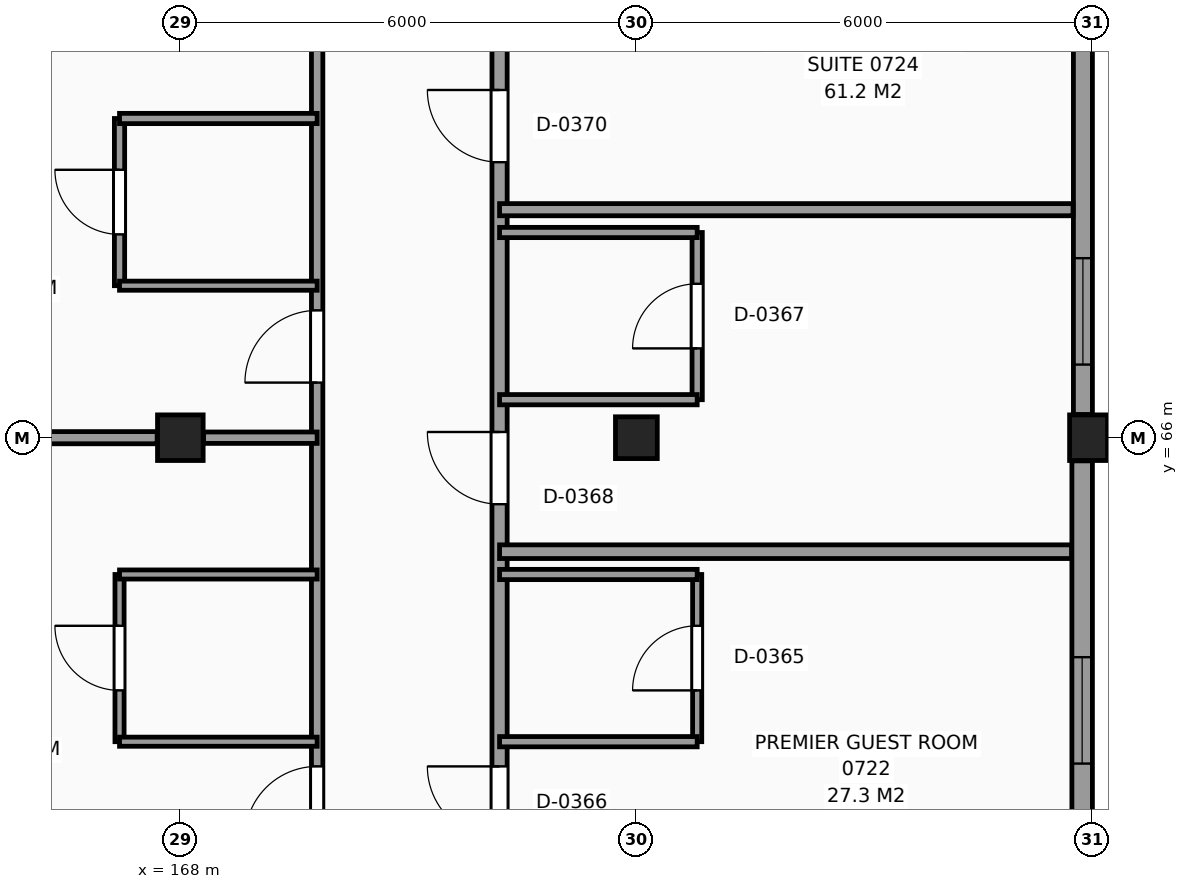
"""IFC4 building model, lengths in metres.
Left out: names, types, materials, properties, quantities, classifications, styles, units other than length and angle.
Written with IfcOpenShell. Run it as: python <this file> out.ifc"""

import sys

from ifc_helpers import new_model, si_unit, direction, frame, frame_2d, origin, origin_2d, place, context, subcontext, project, spatial, rectangle, extrude, element, fill, save


model = new_model("IFC4")
c1 = context("Model", 3, precision=1e-05, world=origin(), true_north=direction((0.0, 1.0)))
c2 = subcontext(c1, "Body", "Model", "MODEL_VIEW")
j1 = project(units=[si_unit("LENGTHUNIT", "METRE"), si_unit("PLANEANGLEUNIT", "RADIAN")], contexts=[c1])
p1 = place(None, origin())
s1 = spatial("IfcSite", under=j1, at=p1, CompositionType="ELEMENT")
p2 = place(p1, origin())
s2 = spatial("IfcBuilding", under=s1, at=p2, CompositionType="ELEMENT")
p3 = place(p2, frame((0.0, 0.0, 31.5)))
s3 = spatial("IfcBuildingStorey", under=s2, at=p3, CompositionType="ELEMENT", Elevation=31.5)
p4 = place(p3, frame((168.0, 66.0, 0.0), z_axis=(0.0, 0.0, 1.0), x_axis=(1.0, 0.0, 0.0)))
e1 = element("IfcColumn", 1, at=p4, inside=s3, PredefinedType="COLUMN", context=c2, shape_type="SweptSolid", body=[
    extrude(rectangle(XDim=0.6, YDim=0.6, at=origin_2d()), origin(), (0.0, 0.0, 1.0), 3.3),
])
p5 = place(p3, frame((174.0, 66.0, 0.0), z_axis=(0.0, 0.0, 1.0), x_axis=(1.0, 0.0, 0.0)))
e2 = element("IfcColumn", 2, at=p5, inside=s3, PredefinedType="COLUMN", context=c2, shape_type="SweptSolid", body=[
    extrude(rectangle(XDim=0.55, YDim=0.55, at=origin_2d()), origin(), (0.0, 0.0, 1.0), 3.3),
])
p6 = place(p3, frame((180.0, 66.0, 0.0), z_axis=(0.0, 0.0, 1.0), x_axis=(1.0, 0.0, 0.0)))
e3 = element("IfcColumn", 3, at=p6, inside=s3, PredefinedType="COLUMN", context=c2, shape_type="SweptSolid", body=[
    extrude(rectangle(XDim=0.6, YDim=0.6, at=origin_2d()), origin(), (0.0, 0.0, 1.0), 3.3),
])
p7 = place(p3, frame((179.865, 60.305, 0.0), z_axis=(0.0, 0.0, 1.0), x_axis=(0.0, 1.0, 0.0)))
e4 = element("IfcWall", 4, at=p7, inside=s3, PredefinedType="SOLIDWALL", context=c2, shape_type="SweptSolid", body=[
    extrude(rectangle(XDim=5.39, YDim=0.27, at=frame_2d((2.695, 0.0))), origin(), (0.0, 0.0, 1.0), 2.42),
])
p8 = place(p7, frame((1.407, 0.0, 0.8)))
e5 = element("IfcOpeningElement", 5, at=p8, cuts=e4, PredefinedType="OPENING", context=c2, shape_type="SweptSolid", body=[
    extrude(rectangle(XDim=1.4, YDim=1.4, at=frame_2d((0.7, 0.7))), frame((0.0, 0.145, 0.0), z_axis=(0.0, -1.0, 0.0), x_axis=(1.0, 0.0, 0.0)), (0.0, 0.0, 1.0), 0.29),
])
p9 = place(p3, frame((179.875, 66.305, 0.0), z_axis=(0.0, 0.0, 1.0), x_axis=(0.0, 1.0, 0.0)))
e6 = element("IfcWall", 6, at=p9, inside=s3, PredefinedType="SOLIDWALL", context=c2, shape_type="SweptSolid", body=[
    extrude(rectangle(XDim=5.39, YDim=0.25, at=frame_2d((2.695, 0.0))), origin(), (0.0, 0.0, 1.0), 2.42),
])
p10 = place(p9, frame((0.657, 0.0, 0.8)))
e7 = element("IfcOpeningElement", 7, at=p10, cuts=e6, PredefinedType="OPENING", context=c2, shape_type="SweptSolid", body=[
    extrude(rectangle(XDim=1.4, YDim=1.4, at=frame_2d((0.7, 0.7))), frame((0.0, 0.135, 0.0), z_axis=(0.0, -1.0, 0.0), x_axis=(1.0, 0.0, 0.0)), (0.0, 0.0, 1.0), 0.27),
])
p11 = place(p3, frame((167.2, 62.0, 0.0), z_axis=(0.0, 0.0, 1.0), x_axis=(0.0, 1.0, 0.0)))
e8 = element("IfcWall", 8, at=p11, inside=s3, PredefinedType="PARTITIONING", context=c2, shape_type="SweptSolid", body=[
    extrude(rectangle(XDim=2.2, YDim=0.12, at=frame_2d((1.1, 0.0))), origin(), (0.0, 0.0, 1.0), 3.07),
])
p12 = place(p11, frame((0.675, 0.0, 0.0)))
e9 = element("IfcOpeningElement", 9, at=p12, cuts=e8, PredefinedType="OPENING", context=c2, shape_type="SweptSolid", body=[
    extrude(rectangle(XDim=0.85, YDim=2.1, at=frame_2d((0.425, 1.05))), frame((0.0, 0.07, 0.0), z_axis=(0.0, -1.0, 0.0), x_axis=(1.0, 0.0, 0.0)), (0.0, 0.0, 1.0), 0.14),
])
p13 = place(p3, frame((167.2, 68.0, 0.0), z_axis=(0.0, 0.0, 1.0), x_axis=(0.0, 1.0, 0.0)))
e10 = element("IfcWall", 10, at=p13, inside=s3, PredefinedType="PARTITIONING", context=c2, shape_type="SweptSolid", body=[
    extrude(rectangle(XDim=2.2, YDim=0.135, at=frame_2d((1.1, 0.0))), origin(), (0.0, 0.0, 1.0), 3.07),
])
p14 = place(p13, frame((0.675, 0.0, 0.0)))
e11 = element("IfcOpeningElement", 11, at=p14, cuts=e10, PredefinedType="OPENING", context=c2, shape_type="SweptSolid", body=[
    extrude(rectangle(XDim=0.85, YDim=2.1, at=frame_2d((0.425, 1.05))), frame((0.0, 0.078, 0.0), z_axis=(0.0, -1.0, 0.0), x_axis=(1.0, 0.0, 0.0)), (0.0, 0.0, 1.0), 0.155),
])
p15 = place(p3, frame((169.8, 42.255, 0.0), z_axis=(0.0, 0.0, 1.0), x_axis=(0.0, 1.0, 0.0)))
e12 = element("IfcWall", 12, at=p15, inside=s3, PredefinedType="PARTITIONING", context=c2, shape_type="SweptSolid", body=[
    extrude(rectangle(XDim=65.565, YDim=0.15, at=frame_2d((32.783, 0.0))), origin(), (0.0, 0.0, 1.0), 3.07),
])
p16 = place(p15, frame((50.145, 0.0, 0.0)))
e13 = element("IfcOpeningElement", 13, at=p16, cuts=e12, PredefinedType="OPENING", context=c2, shape_type="SweptSolid", body=[
    extrude(rectangle(XDim=1.2, YDim=2.2, at=frame_2d((0.6, 1.1))), frame((0.0, 0.085, 0.0), z_axis=(0.0, -1.0, 0.0), x_axis=(1.0, 0.0, 0.0)), (0.0, 0.0, 1.0), 0.17),
])
p17 = place(p15, frame((0.42, 0.0, 0.0)))
e14 = element("IfcOpeningElement", 14, at=p17, cuts=e12, PredefinedType="OPENING", context=c2, shape_type="SweptSolid", body=[
    extrude(rectangle(XDim=0.95, YDim=2.1, at=frame_2d((0.475, 1.05))), frame((0.0, 0.085, 0.0), z_axis=(0.0, -1.0, 0.0), x_axis=(1.0, 0.0, 0.0)), (0.0, 0.0, 1.0), 0.17),
])
p18 = place(p15, frame((6.47, 0.0, 0.0)))
e15 = element("IfcOpeningElement", 15, at=p18, cuts=e12, PredefinedType="OPENING", context=c2, shape_type="SweptSolid", body=[
    extrude(rectangle(XDim=0.95, YDim=2.1, at=frame_2d((0.475, 1.05))), frame((0.0, 0.085, 0.0), z_axis=(0.0, -1.0, 0.0), x_axis=(1.0, 0.0, 0.0)), (0.0, 0.0, 1.0), 0.17),
])
p19 = place(p15, frame((12.47, 0.0, 0.0)))
e16 = element("IfcOpeningElement", 16, at=p19, cuts=e12, PredefinedType="OPENING", context=c2, shape_type="SweptSolid", body=[
    extrude(rectangle(XDim=0.95, YDim=2.1, at=frame_2d((0.475, 1.05))), frame((0.0, 0.085, 0.0), z_axis=(0.0, -1.0, 0.0), x_axis=(1.0, 0.0, 0.0)), (0.0, 0.0, 1.0), 0.17),
])
p20 = place(p15, frame((18.47, 0.0, 0.0)))
e17 = element("IfcOpeningElement", 17, at=p20, cuts=e12, PredefinedType="OPENING", context=c2, shape_type="SweptSolid", body=[
    extrude(rectangle(XDim=0.95, YDim=2.1, at=frame_2d((0.475, 1.05))), frame((0.0, 0.085, 0.0), z_axis=(0.0, -1.0, 0.0), x_axis=(1.0, 0.0, 0.0)), (0.0, 0.0, 1.0), 0.17),
])
p21 = place(p15, frame((24.47, 0.0, 0.0)))
e18 = element("IfcOpeningElement", 18, at=p21, cuts=e12, PredefinedType="OPENING", context=c2, shape_type="SweptSolid", body=[
    extrude(rectangle(XDim=0.95, YDim=2.1, at=frame_2d((0.475, 1.05))), frame((0.0, 0.085, 0.0), z_axis=(0.0, -1.0, 0.0), x_axis=(1.0, 0.0, 0.0)), (0.0, 0.0, 1.0), 0.17),
])
p22 = place(p15, frame((30.47, 0.0, 0.0)))
e19 = element("IfcOpeningElement", 19, at=p22, cuts=e12, PredefinedType="OPENING", context=c2, shape_type="SweptSolid", body=[
    extrude(rectangle(XDim=0.95, YDim=2.1, at=frame_2d((0.475, 1.05))), frame((0.0, 0.085, 0.0), z_axis=(0.0, -1.0, 0.0), x_axis=(1.0, 0.0, 0.0)), (0.0, 0.0, 1.0), 0.17),
])
p23 = place(p15, frame((54.47, 0.0, 0.0)))
e20 = element("IfcOpeningElement", 20, at=p23, cuts=e12, PredefinedType="OPENING", context=c2, shape_type="SweptSolid", body=[
    extrude(rectangle(XDim=0.95, YDim=2.1, at=frame_2d((0.475, 1.05))), frame((0.0, 0.085, 0.0), z_axis=(0.0, -1.0, 0.0), x_axis=(1.0, 0.0, 0.0)), (0.0, 0.0, 1.0), 0.17),
])
p24 = place(p15, frame((60.47, 0.0, 0.0)))
e21 = element("IfcOpeningElement", 21, at=p24, cuts=e12, PredefinedType="OPENING", context=c2, shape_type="SweptSolid", body=[
    extrude(rectangle(XDim=0.95, YDim=2.1, at=frame_2d((0.475, 1.05))), frame((0.0, 0.085, 0.0), z_axis=(0.0, -1.0, 0.0), x_axis=(1.0, 0.0, 0.0)), (0.0, 0.0, 1.0), 0.17),
])
p25 = place(p3, frame((172.2, 42.255, 0.0), z_axis=(0.0, 0.0, 1.0), x_axis=(0.0, 1.0, 0.0)))
e22 = element("IfcWall", 22, at=p25, inside=s3, PredefinedType="PARTITIONING", context=c2, shape_type="SweptSolid", body=[
    extrude(rectangle(XDim=65.565, YDim=0.2, at=frame_2d((32.783, 0.0))), origin(), (0.0, 0.0, 1.0), 3.07),
])
p26 = place(p25, frame((0.42, 0.0, 0.0)))
e23 = element("IfcOpeningElement", 23, at=p26, cuts=e22, PredefinedType="OPENING", context=c2, shape_type="SweptSolid", body=[
    extrude(rectangle(XDim=0.95, YDim=2.1, at=frame_2d((0.475, 1.05))), frame((0.0, 0.11, 0.0), z_axis=(0.0, -1.0, 0.0), x_axis=(1.0, 0.0, 0.0)), (0.0, 0.0, 1.0), 0.22),
])
p27 = place(p25, frame((6.47, 0.0, 0.0)))
e24 = element("IfcOpeningElement", 24, at=p27, cuts=e22, PredefinedType="OPENING", context=c2, shape_type="SweptSolid", body=[
    extrude(rectangle(XDim=0.95, YDim=2.1, at=frame_2d((0.475, 1.05))), frame((0.0, 0.11, 0.0), z_axis=(0.0, -1.0, 0.0), x_axis=(1.0, 0.0, 0.0)), (0.0, 0.0, 1.0), 0.22),
])
p28 = place(p25, frame((16.27, 0.0, 0.0)))
e25 = element("IfcOpeningElement", 25, at=p28, cuts=e22, PredefinedType="OPENING", context=c2, shape_type="SweptSolid", body=[
    extrude(rectangle(XDim=0.95, YDim=2.1, at=frame_2d((0.475, 1.05))), frame((0.0, 0.11, 0.0), z_axis=(0.0, -1.0, 0.0), x_axis=(1.0, 0.0, 0.0)), (0.0, 0.0, 1.0), 0.22),
])
p29 = place(p25, frame((18.47, 0.0, 0.0)))
e26 = element("IfcOpeningElement", 26, at=p29, cuts=e22, PredefinedType="OPENING", context=c2, shape_type="SweptSolid", body=[
    extrude(rectangle(XDim=0.95, YDim=2.1, at=frame_2d((0.475, 1.05))), frame((0.0, 0.11, 0.0), z_axis=(0.0, -1.0, 0.0), x_axis=(1.0, 0.0, 0.0)), (0.0, 0.0, 1.0), 0.22),
])
p30 = place(p25, frame((22.87, 0.0, 0.0)))
e27 = element("IfcOpeningElement", 27, at=p30, cuts=e22, PredefinedType="OPENING", context=c2, shape_type="SweptSolid", body=[
    extrude(rectangle(XDim=0.95, YDim=2.1, at=frame_2d((0.475, 1.05))), frame((0.0, 0.11, 0.0), z_axis=(0.0, -1.0, 0.0), x_axis=(1.0, 0.0, 0.0)), (0.0, 0.0, 1.0), 0.22),
])
p31 = place(p25, frame((27.37, 0.0, 0.0)))
e28 = element("IfcOpeningElement", 28, at=p31, cuts=e22, PredefinedType="OPENING", context=c2, shape_type="SweptSolid", body=[
    extrude(rectangle(XDim=0.95, YDim=2.1, at=frame_2d((0.475, 1.05))), frame((0.0, 0.11, 0.0), z_axis=(0.0, -1.0, 0.0), x_axis=(1.0, 0.0, 0.0)), (0.0, 0.0, 1.0), 0.22),
])
p32 = place(p25, frame((36.47, 0.0, 0.0)))
e29 = element("IfcOpeningElement", 29, at=p32, cuts=e22, PredefinedType="OPENING", context=c2, shape_type="SweptSolid", body=[
    extrude(rectangle(XDim=0.95, YDim=2.1, at=frame_2d((0.475, 1.05))), frame((0.0, 0.11, 0.0), z_axis=(0.0, -1.0, 0.0), x_axis=(1.0, 0.0, 0.0)), (0.0, 0.0, 1.0), 0.22),
])
p33 = place(p25, frame((40.87, 0.0, 0.0)))
e30 = element("IfcOpeningElement", 30, at=p33, cuts=e22, PredefinedType="OPENING", context=c2, shape_type="SweptSolid", body=[
    extrude(rectangle(XDim=0.95, YDim=2.1, at=frame_2d((0.475, 1.05))), frame((0.0, 0.11, 0.0), z_axis=(0.0, -1.0, 0.0), x_axis=(1.0, 0.0, 0.0)), (0.0, 0.0, 1.0), 0.22),
])
p34 = place(p25, frame((48.07, 0.0, 0.0)))
e31 = element("IfcOpeningElement", 31, at=p34, cuts=e22, PredefinedType="OPENING", context=c2, shape_type="SweptSolid", body=[
    extrude(rectangle(XDim=0.95, YDim=2.1, at=frame_2d((0.475, 1.05))), frame((0.0, 0.11, 0.0), z_axis=(0.0, -1.0, 0.0), x_axis=(1.0, 0.0, 0.0)), (0.0, 0.0, 1.0), 0.22),
])
p35 = place(p25, frame((56.32, 0.0, 0.0)))
e32 = element("IfcOpeningElement", 32, at=p35, cuts=e22, PredefinedType="OPENING", context=c2, shape_type="SweptSolid", body=[
    extrude(rectangle(XDim=0.95, YDim=2.1, at=frame_2d((0.475, 1.05))), frame((0.0, 0.11, 0.0), z_axis=(0.0, -1.0, 0.0), x_axis=(1.0, 0.0, 0.0)), (0.0, 0.0, 1.0), 0.22),
])
p36 = place(p25, frame((60.47, 0.0, 0.0)))
e33 = element("IfcOpeningElement", 33, at=p36, cuts=e22, PredefinedType="OPENING", context=c2, shape_type="SweptSolid", body=[
    extrude(rectangle(XDim=0.95, YDim=2.1, at=frame_2d((0.475, 1.05))), frame((0.0, 0.11, 0.0), z_axis=(0.0, -1.0, 0.0), x_axis=(1.0, 0.0, 0.0)), (0.0, 0.0, 1.0), 0.22),
])
p37 = place(p3, frame((174.8, 62.0, 0.0), z_axis=(0.0, 0.0, 1.0), x_axis=(0.0, 1.0, 0.0)))
e34 = element("IfcWall", 34, at=p37, inside=s3, PredefinedType="PARTITIONING", context=c2, shape_type="SweptSolid", body=[
    extrude(rectangle(XDim=2.2, YDim=0.12, at=frame_2d((1.1, 0.0))), origin(), (0.0, 0.0, 1.0), 3.07),
])
p38 = place(p37, frame((0.675, 0.0, 0.0)))
e35 = element("IfcOpeningElement", 35, at=p38, cuts=e34, PredefinedType="OPENING", context=c2, shape_type="SweptSolid", body=[
    extrude(rectangle(XDim=0.85, YDim=2.1, at=frame_2d((0.425, 1.05))), frame((0.0, 0.07, 0.0), z_axis=(0.0, -1.0, 0.0), x_axis=(1.0, 0.0, 0.0)), (0.0, 0.0, 1.0), 0.14),
])
p39 = place(p3, frame((174.8, 66.5, 0.0), z_axis=(0.0, 0.0, 1.0), x_axis=(0.0, 1.0, 0.0)))
e36 = element("IfcWall", 36, at=p39, inside=s3, PredefinedType="PARTITIONING", context=c2, shape_type="SweptSolid", body=[
    extrude(rectangle(XDim=2.2, YDim=0.135, at=frame_2d((1.1, 0.0))), origin(), (0.0, 0.0, 1.0), 3.07),
])
p40 = place(p39, frame((0.675, 0.0, 0.0)))
e37 = element("IfcOpeningElement", 37, at=p40, cuts=e36, PredefinedType="OPENING", context=c2, shape_type="SweptSolid", body=[
    extrude(rectangle(XDim=0.85, YDim=2.1, at=frame_2d((0.425, 1.05))), frame((0.0, 0.078, 0.0), z_axis=(0.0, -1.0, 0.0), x_axis=(1.0, 0.0, 0.0)), (0.0, 0.0, 1.0), 0.155),
])
p41 = place(p3, frame((167.2, 62.0, 0.0), z_axis=(0.0, 0.0, 1.0), x_axis=(1.0, 0.0, 0.0)))
e38 = element("IfcWall", 38, at=p41, inside=s3, PredefinedType="PARTITIONING", context=c2, shape_type="SweptSolid", body=[
    extrude(rectangle(XDim=2.6, YDim=0.12, at=frame_2d((1.3, 0.0))), origin(), (0.0, 0.0, 1.0), 3.07),
])
p42 = place(p3, frame((172.2, 62.0, 0.0), z_axis=(0.0, 0.0, 1.0), x_axis=(1.0, 0.0, 0.0)))
e39 = element("IfcWall", 39, at=p42, inside=s3, PredefinedType="PARTITIONING", context=c2, shape_type="SweptSolid", body=[
    extrude(rectangle(XDim=2.6, YDim=0.135, at=frame_2d((1.3, 0.0))), origin(), (0.0, 0.0, 1.0), 3.07),
])
p43 = place(p3, frame((167.2, 64.2, 0.0), z_axis=(0.0, 0.0, 1.0), x_axis=(1.0, 0.0, 0.0)))
e40 = element("IfcWall", 40, at=p43, inside=s3, PredefinedType="PARTITIONING", context=c2, shape_type="SweptSolid", body=[
    extrude(rectangle(XDim=2.6, YDim=0.12, at=frame_2d((1.3, 0.0))), origin(), (0.0, 0.0, 1.0), 3.07),
])
p44 = place(p3, frame((172.2, 64.2, 0.0), z_axis=(0.0, 0.0, 1.0), x_axis=(1.0, 0.0, 0.0)))
e41 = element("IfcWall", 41, at=p44, inside=s3, PredefinedType="PARTITIONING", context=c2, shape_type="SweptSolid", body=[
    extrude(rectangle(XDim=2.6, YDim=0.135, at=frame_2d((1.3, 0.0))), origin(), (0.0, 0.0, 1.0), 3.07),
])
p45 = place(p3, frame((172.2, 64.5, 0.0), z_axis=(0.0, 0.0, 1.0), x_axis=(1.0, 0.0, 0.0)))
e42 = element("IfcWall", 42, at=p45, inside=s3, PredefinedType="PARTITIONING", context=c2, shape_type="SweptSolid", body=[
    extrude(rectangle(XDim=7.525, YDim=0.18, at=frame_2d((3.763, 0.0))), origin(), (0.0, 0.0, 1.0), 3.07),
])
p46 = place(p3, frame((162.28, 66.0, 0.0), z_axis=(0.0, 0.0, 1.0), x_axis=(1.0, 0.0, 0.0)))
e43 = element("IfcWall", 43, at=p46, inside=s3, PredefinedType="PARTITIONING", context=c2, shape_type="SweptSolid", body=[
    extrude(rectangle(XDim=5.415, YDim=0.16, at=frame_2d((2.708, 0.0))), origin(), (0.0, 0.0, 1.0), 2.27),
])
p47 = place(p3, frame((168.305, 66.0, 0.0), z_axis=(0.0, 0.0, 1.0), x_axis=(1.0, 0.0, 0.0)))
e44 = element("IfcWall", 44, at=p47, inside=s3, PredefinedType="PARTITIONING", context=c2, shape_type="SweptSolid", body=[
    extrude(rectangle(XDim=1.495, YDim=0.15, at=frame_2d((0.748, 0.0))), origin(), (0.0, 0.0, 1.0), 2.27),
])
p48 = place(p3, frame((172.2, 66.5, 0.0), z_axis=(0.0, 0.0, 1.0), x_axis=(1.0, 0.0, 0.0)))
e45 = element("IfcWall", 45, at=p48, inside=s3, PredefinedType="PARTITIONING", context=c2, shape_type="SweptSolid", body=[
    extrude(rectangle(XDim=2.6, YDim=0.135, at=frame_2d((1.3, 0.0))), origin(), (0.0, 0.0, 1.0), 3.07),
])
p49 = place(p3, frame((167.2, 68.0, 0.0), z_axis=(0.0, 0.0, 1.0), x_axis=(1.0, 0.0, 0.0)))
e46 = element("IfcWall", 46, at=p49, inside=s3, PredefinedType="PARTITIONING", context=c2, shape_type="SweptSolid", body=[
    extrude(rectangle(XDim=2.6, YDim=0.12, at=frame_2d((1.3, 0.0))), origin(), (0.0, 0.0, 1.0), 3.07),
])
p50 = place(p3, frame((172.2, 68.7, 0.0), z_axis=(0.0, 0.0, 1.0), x_axis=(1.0, 0.0, 0.0)))
e47 = element("IfcWall", 47, at=p50, inside=s3, PredefinedType="PARTITIONING", context=c2, shape_type="SweptSolid", body=[
    extrude(rectangle(XDim=2.6, YDim=0.135, at=frame_2d((1.3, 0.0))), origin(), (0.0, 0.0, 1.0), 3.07),
])
p51 = place(p3, frame((172.2, 69.0, 0.0), z_axis=(0.0, 0.0, 1.0), x_axis=(1.0, 0.0, 0.0)))
e48 = element("IfcWall", 48, at=p51, inside=s3, PredefinedType="PARTITIONING", context=c2, shape_type="SweptSolid", body=[
    extrude(rectangle(XDim=7.545, YDim=0.16, at=frame_2d((3.772, 0.0))), origin(), (0.0, 0.0, 1.0), 3.07),
])
p52 = place(p3, frame((167.2, 70.2, 0.0), z_axis=(0.0, 0.0, 1.0), x_axis=(1.0, 0.0, 0.0)))
e49 = element("IfcWall", 49, at=p52, inside=s3, PredefinedType="PARTITIONING", context=c2, shape_type="SweptSolid", body=[
    extrude(rectangle(XDim=2.6, YDim=0.135, at=frame_2d((1.3, 0.0))), origin(), (0.0, 0.0, 1.0), 3.07),
])
p53 = place(p8, origin())
e50 = element("IfcWindow", 50, at=p53, inside=s3, PartitioningType="SINGLE_PANEL", PredefinedType="WINDOW", context=c2, shape_type="SweptSolid", body=[
    extrude(rectangle(XDim=1.4, YDim=1.4, at=frame_2d((0.7, 0.7))), frame((0.0, 0.03, 0.0), z_axis=(0.0, -1.0, 0.0), x_axis=(1.0, 0.0, 0.0)), (0.0, 0.0, 1.0), 0.06),
])
fill(e5, e50)
p54 = place(p10, origin())
e51 = element("IfcWindow", 51, at=p54, inside=s3, PartitioningType="SINGLE_PANEL", PredefinedType="WINDOW", context=c2, shape_type="SweptSolid", body=[
    extrude(rectangle(XDim=1.4, YDim=1.4, at=frame_2d((0.7, 0.7))), frame((0.0, 0.03, 0.0), z_axis=(0.0, -1.0, 0.0), x_axis=(1.0, 0.0, 0.0)), (0.0, 0.0, 1.0), 0.06),
])
fill(e7, e51)
p55 = place(p38, origin())
e52 = element("IfcDoor", 52, at=p55, inside=s3, OperationType="SINGLE_SWING_LEFT", PredefinedType="DOOR", context=c2, shape_type="SweptSolid", body=[
    extrude(rectangle(XDim=0.85, YDim=2.1, at=frame_2d((0.425, 1.05))), frame((0.0, 0.025, 0.0), z_axis=(0.0, -1.0, 0.0), x_axis=(1.0, 0.0, 0.0)), (0.0, 0.0, 1.0), 0.05),
])
fill(e35, e52)
p56 = place(p29, origin())
e53 = element("IfcDoor", 53, at=p56, inside=s3, OperationType="SINGLE_SWING_RIGHT", PredefinedType="DOOR", context=c2, shape_type="SweptSolid", body=[
    extrude(rectangle(XDim=0.95, YDim=2.1, at=frame_2d((0.475, 1.05))), frame((0.0, 0.025, 0.0), z_axis=(0.0, -1.0, 0.0), x_axis=(1.0, 0.0, 0.0)), (0.0, 0.0, 1.0), 0.05),
])
fill(e26, e53)
p57 = place(p40, origin())
e54 = element("IfcDoor", 54, at=p57, inside=s3, OperationType="SINGLE_SWING_LEFT", PredefinedType="DOOR", context=c2, shape_type="SweptSolid", body=[
    extrude(rectangle(XDim=0.85, YDim=2.1, at=frame_2d((0.425, 1.05))), frame((0.0, 0.025, 0.0), z_axis=(0.0, -1.0, 0.0), x_axis=(1.0, 0.0, 0.0)), (0.0, 0.0, 1.0), 0.05),
])
fill(e37, e54)
p58 = place(p30, origin())
e55 = element("IfcDoor", 55, at=p58, inside=s3, OperationType="SINGLE_SWING_RIGHT", PredefinedType="DOOR", context=c2, shape_type="SweptSolid", body=[
    extrude(rectangle(XDim=0.95, YDim=2.1, at=frame_2d((0.475, 1.05))), frame((0.0, 0.025, 0.0), z_axis=(0.0, -1.0, 0.0), x_axis=(1.0, 0.0, 0.0)), (0.0, 0.0, 1.0), 0.05),
])
fill(e27, e55)
p59 = place(p31, origin())
e56 = element("IfcDoor", 56, at=p59, inside=s3, OperationType="SINGLE_SWING_RIGHT", PredefinedType="DOOR", context=c2, shape_type="SweptSolid", body=[
    extrude(rectangle(XDim=0.95, YDim=2.1, at=frame_2d((0.475, 1.05))), frame((0.0, 0.025, 0.0), z_axis=(0.0, -1.0, 0.0), x_axis=(1.0, 0.0, 0.0)), (0.0, 0.0, 1.0), 0.05),
])
fill(e28, e56)
p60 = place(p12, origin())
e57 = element("IfcDoor", 57, at=p60, inside=s3, OperationType="SINGLE_SWING_RIGHT", PredefinedType="DOOR", context=c2, shape_type="SweptSolid", body=[
    extrude(rectangle(XDim=0.85, YDim=2.1, at=frame_2d((0.425, 1.05))), frame((0.0, 0.025, 0.0), z_axis=(0.0, -1.0, 0.0), x_axis=(1.0, 0.0, 0.0)), (0.0, 0.0, 1.0), 0.05),
])
fill(e9, e57)
p61 = place(p20, origin())
e58 = element("IfcDoor", 58, at=p61, inside=s3, OperationType="SINGLE_SWING_LEFT", PredefinedType="DOOR", context=c2, shape_type="SweptSolid", body=[
    extrude(rectangle(XDim=0.95, YDim=2.1, at=frame_2d((0.475, 1.05))), frame((0.0, 0.025, 0.0), z_axis=(0.0, -1.0, 0.0), x_axis=(1.0, 0.0, 0.0)), (0.0, 0.0, 1.0), 0.05),
])
fill(e17, e58)
p62 = place(p14, origin())
e59 = element("IfcDoor", 59, at=p62, inside=s3, OperationType="SINGLE_SWING_RIGHT", PredefinedType="DOOR", context=c2, shape_type="SweptSolid", body=[
    extrude(rectangle(XDim=0.85, YDim=2.1, at=frame_2d((0.425, 1.05))), frame((0.0, 0.025, 0.0), z_axis=(0.0, -1.0, 0.0), x_axis=(1.0, 0.0, 0.0)), (0.0, 0.0, 1.0), 0.05),
])
fill(e11, e59)
p63 = place(p21, origin())
e60 = element("IfcDoor", 60, at=p63, inside=s3, OperationType="SINGLE_SWING_LEFT", PredefinedType="DOOR", context=c2, shape_type="SweptSolid", body=[
    extrude(rectangle(XDim=0.95, YDim=2.1, at=frame_2d((0.475, 1.05))), frame((0.0, 0.025, 0.0), z_axis=(0.0, -1.0, 0.0), x_axis=(1.0, 0.0, 0.0)), (0.0, 0.0, 1.0), 0.05),
])
fill(e18, e60)
save(model, sys.argv[1])
